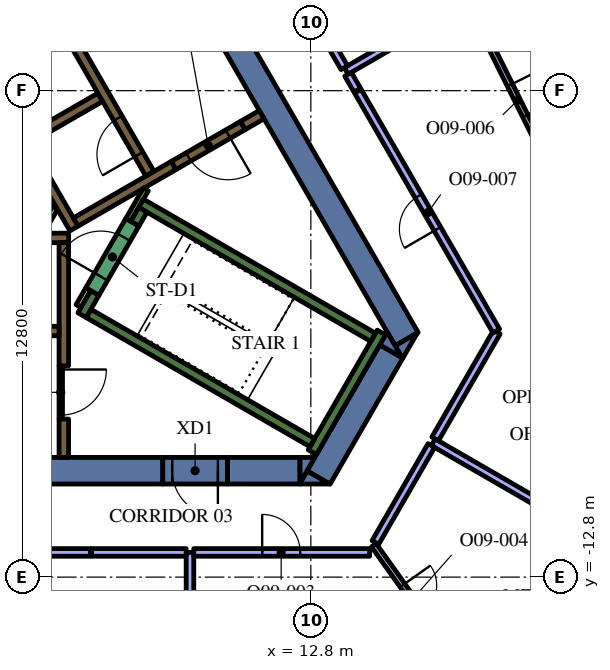
"""IFC4 building model, lengths in metres.
Left out: names, types, materials, properties, quantities, classifications, styles, units other than length and angle.
Written with IfcOpenShell. Run it as: python <this file> out.ifc"""

import sys

from ifc_helpers import new_model, si_unit, direction, frame, frame_2d, origin, place, context, subcontext, project, spatial, polyline, rectangle, outline, extrude, element, fill, save


model = new_model("IFC4")
c1 = context("Model", 3, precision=1e-05, world=origin(), true_north=direction((0.0, 1.0)))
c2 = subcontext(c1, "Body", "Model", "MODEL_VIEW")
j1 = project(units=[si_unit("LENGTHUNIT", "METRE"), si_unit("PLANEANGLEUNIT", "RADIAN")], contexts=[c1])
p1 = place(None, origin())
s1 = spatial("IfcSite", under=j1, at=p1, CompositionType="ELEMENT")
p2 = place(p1, origin())
s2 = spatial("IfcBuilding", under=s1, at=p2, CompositionType="ELEMENT")
p3 = place(p2, frame((0.0, 0.0, 239.4)))
s3 = spatial("IfcBuildingStorey", under=s2, at=p3, CompositionType="ELEMENT", Elevation=239.4)
p4 = place(p3, frame((9.085, 4.264, 0.0), z_axis=(0.0, 0.0, 1.0), x_axis=(0.499998082512, -0.866026510844, 0.0)))
e1 = element("IfcWall", 1, at=p4, inside=s3, PredefinedType="SOLIDWALL", context=c2, shape_type="SweptSolid", body=[
    extrude(rectangle(XDim=12.472, YDim=0.7, at=frame_2d((6.236, 0.0))), origin(), (0.0, 0.0, 1.0), 4.2),
])
p5 = place(p3, origin())
e2 = element("IfcWall", 2, at=p5, inside=s3, PredefinedType="SOLIDWALL", context=c2, shape_type="SweptSolid", body=[
    extrude(outline(polyline([(15.213, -7.05), (15.019, -6.714), (15.601, -6.378), (15.213, -7.05)])), origin(), (0.0, 0.0, 1.0), 4.2),
])
p6 = place(p3, frame((13.003, -10.179, 0.0), z_axis=(0.0, 0.0, 1.0), x_axis=(0.499972675833, 0.866041178825, 0.0)))
e3 = element("IfcWall", 3, at=p6, inside=s3, PredefinedType="SOLIDWALL", context=c2, shape_type="SweptSolid", body=[
    extrude(rectangle(XDim=3.829, YDim=0.7, at=frame_2d((1.915, 0.0))), origin(), (0.0, 0.0, 1.0), 4.2),
])
e4 = element("IfcWall", 4, at=p5, inside=s3, PredefinedType="SOLIDWALL", context=c2, shape_type="SweptSolid", body=[
    extrude(outline(polyline([(12.5, -10.35), (12.698, -10.005), (13.296, -10.35), (12.5, -10.35)])), origin(), (0.0, 0.0, 1.0), 4.2),
])
e5 = element("IfcWall", 5, at=p5, inside=s3, PredefinedType="SOLIDWALL", context=c2, shape_type="SweptSolid", body=[
    extrude(outline(polyline([(14.809, -6.35), (15.197, -7.022), (14.615, -6.686), (14.809, -6.35)])), origin(), (0.0, 0.0, 1.0), 4.2),
])
p7 = place(p3, frame((10.604, -10.0, 0.0), z_axis=(0.0, 0.0, 1.0), x_axis=(1.0, 0.0, 0.0)))
e6 = element("IfcWall", 6, at=p7, inside=s3, PredefinedType="SOLIDWALL", context=c2, shape_type="SweptSolid", body=[
    extrude(rectangle(XDim=1.909, YDim=0.7, at=frame_2d((0.955, 0.0))), origin(), (0.0, 0.0, 1.0), 4.2),
])
e7 = element("IfcWall", 7, at=p5, inside=s3, PredefinedType="SOLIDWALL", context=c2, shape_type="SweptSolid", body=[
    extrude(outline(polyline([(12.904, -9.65), (12.516, -10.322), (12.516, -9.65), (12.904, -9.65)])), origin(), (0.0, 0.0, 1.0), 4.2),
])
p8 = place(p3, frame((8.904, -10.0, 0.0), z_axis=(0.0, 0.0, 1.0), x_axis=(-1.0, 0.0, 0.0)))
e8 = element("IfcWall", 8, at=p8, inside=s3, PredefinedType="SOLIDWALL", context=c2, shape_type="SweptSolid", body=[
    extrude(rectangle(XDim=22.226, YDim=0.7, at=frame_2d((11.113, 0.0))), origin(), (0.0, 0.0, 1.0), 4.2),
])
p9 = place(p3, frame((12.84, -9.511, 0.0), z_axis=(0.0, 0.0, 1.0), x_axis=(0.500048121057, 0.865997619297, 0.0)))
e9 = element("IfcWall", 9, at=p9, inside=s3, PredefinedType="SOLIDWALL", context=c2, shape_type="SweptSolid", body=[
    extrude(rectangle(XDim=3.634, YDim=0.25, at=frame_2d((1.817, 0.0))), origin(), (0.0, 0.0, 1.0), 4.2),
])
p10 = place(p3, frame((12.84, -9.261, 0.0), z_axis=(0.0, 0.0, 1.0), x_axis=(-0.866013990052, 0.500019768644, 0.0)))
e10 = element("IfcWall", 10, at=p10, inside=s3, PredefinedType="SOLIDWALL", context=c2, shape_type="SweptSolid", body=[
    extrude(rectangle(XDim=6.8, YDim=0.25, at=frame_2d((3.4, 0.0))), origin(), (0.0, 0.0, 1.0), 4.2),
])
p11 = place(p3, frame((6.78, -5.906, 0.0), z_axis=(0.0, 0.0, 1.0), x_axis=(0.500223362819, 0.865896406789, 0.0)))
e11 = element("IfcWall", 11, at=p11, inside=s3, PredefinedType="SOLIDWALL", context=c2, shape_type="SweptSolid", body=[
    extrude(rectangle(XDim=0.675, YDim=0.25, at=frame_2d((0.337, 0.0))), origin(), (0.0, 0.0, 1.0), 4.2),
])
p12 = place(p3, frame((8.334, -2.964, 0.0), z_axis=(0.0, 0.0, 1.0), x_axis=(0.866016039709, -0.500016218704, 0.0)))
e12 = element("IfcWall", 12, at=p12, inside=s3, PredefinedType="SOLIDWALL", context=c2, shape_type="SweptSolid", body=[
    extrude(rectangle(XDim=7.05, YDim=0.25, at=frame_2d((3.525, 0.0))), origin(), (0.0, 0.0, 1.0), 4.2),
])
p13 = place(p3, frame((8.168, -3.503, 0.0), z_axis=(0.0, 0.0, 1.0), x_axis=(0.49972245349, 0.866185586049, 0.0)))
e13 = element("IfcWall", 13, at=p13, inside=s3, PredefinedType="SOLIDWALL", context=c2, shape_type="SweptSolid", body=[
    extrude(rectangle(XDim=0.425, YDim=0.25, at=frame_2d((0.212, 0.0))), origin(), (0.0, 0.0, 1.0), 4.2),
])
p14 = place(p3, frame((-5.545, -3.875, 0.0), z_axis=(0.0, 0.0, 1.0), x_axis=(1.0, 0.0, 0.0)))
e14 = element("IfcWall", 14, at=p14, inside=s3, PredefinedType="SOLIDWALL", context=c2, shape_type="SweptSolid", body=[
    extrude(rectangle(XDim=11.97, YDim=0.25, at=frame_2d((5.985, 0.0))), origin(), (0.0, 0.0, 1.0), 4.2),
])
p15 = place(p3, frame((6.3, -7.24, 0.0), z_axis=(0.0, 0.0, 1.0), x_axis=(0.0, 1.0, 0.0)))
e15 = element("IfcWall", 15, at=p15, inside=s3, PredefinedType="SOLIDWALL", context=c2, shape_type="SweptSolid", body=[
    extrude(rectangle(XDim=3.24, YDim=0.25, at=frame_2d((1.62, 0.0))), origin(), (0.0, 0.0, 1.0), 4.2),
])
p16 = place(p3, frame((6.3, -9.65, 0.0), z_axis=(0.0, 0.0, 1.0), x_axis=(0.0, 1.0, 0.0)))
e16 = element("IfcWall", 16, at=p16, inside=s3, PredefinedType="SOLIDWALL", context=c2, shape_type="SweptSolid", body=[
    extrude(rectangle(XDim=1.008, YDim=0.25, at=frame_2d((0.504, 0.0))), origin(), (0.0, 0.0, 1.0), 4.2),
])
p17 = place(p3, frame((11.507, -0.631, 0.0), z_axis=(0.0, 0.0, 1.0), x_axis=(-0.866093731455, -0.499881634324, 0.0)))
e17 = element("IfcWall", 17, at=p17, inside=s3, PredefinedType="SOLIDWALL", context=c2, shape_type="SweptSolid", body=[
    extrude(rectangle(XDim=0.575, YDim=0.25, at=frame_2d((0.288, 0.0))), origin(), (0.0, 0.0, 1.0), 4.2),
])
p18 = place(p3, frame((6.568, -3.627, 0.0), z_axis=(0.0, 0.0, 1.0), x_axis=(-0.499999455981, 0.866025717874, 0.0)))
e18 = element("IfcWall", 18, at=p18, inside=s3, PredefinedType="SOLIDWALL", context=c2, shape_type="SweptSolid", body=[
    extrude(rectangle(XDim=11.978, YDim=0.25, at=frame_2d((5.989, 0.0))), origin(), (0.0, 0.0, 1.0), 4.2),
])
for number, where, z_axis, x_axis in (
    (19, (4.094, 0.909, 0.0), (0.0, 0.0, 1.0), (0.866, 0.5, 0.0)),
    (20, (5.354, -1.274, 0.0), (0.0, 0.0, 1.0), (0.866, 0.5, 0.0)),
):
    element("IfcWall", number, at=place(p3, frame(where, z_axis=z_axis, x_axis=x_axis)), inside=s3, PredefinedType="SOLIDWALL", context=c2, shape_type="SweptSolid", body=[
        extrude(rectangle(XDim=2.2, YDim=0.25, at=frame_2d((1.1, 0.0))), origin(), (0.0, 0.0, 1.0), 4.2),
    ])
p19 = place(p3, frame((6.614, -3.456, 0.0), z_axis=(0.0, 0.0, 1.0), x_axis=(0.866032512851, 0.499987686533, 0.0)))
e21 = element("IfcWall", 21, at=p19, inside=s3, PredefinedType="SOLIDWALL", context=c2, shape_type="SweptSolid", body=[
    extrude(rectangle(XDim=2.975, YDim=0.25, at=frame_2d((1.487, 0.0))), origin(), (0.0, 0.0, 1.0), 4.2),
])
p20 = place(p3, frame((6.945, -5.222, 0.0), z_axis=(0.0, 0.0, 1.0), x_axis=(-0.499818422106, -0.866130212453, 0.0)))
e22 = element("IfcWall", 22, at=p20, inside=s3, PredefinedType="PARTITIONING", context=c2, shape_type="SweptSolid", body=[
    extrude(rectangle(XDim=0.514, YDim=0.15, at=frame_2d((0.257, 0.0))), origin(), (0.0, 0.0, 1.0), 3.45),
])
p21 = place(p3, frame((8.459, -2.599, 0.0), z_axis=(0.0, 0.0, 1.0), x_axis=(-0.500041054325, -0.866001699761, 0.0)))
e23 = element("IfcWall", 23, at=p21, inside=s3, PredefinedType="PARTITIONING", context=c2, shape_type="SweptSolid", body=[
    extrude(rectangle(XDim=0.929, YDim=0.15, at=frame_2d((0.464, 0.0))), origin(), (0.0, 0.0, 1.0), 4.2),
])
p22 = place(p3, frame((5.705, -3.718, 0.0), z_axis=(0.0, 0.0, 1.0), x_axis=(0.499962090823, 0.866047289552, 0.0)))
e24 = element("IfcWall", 24, at=p22, inside=s3, PredefinedType="PARTITIONING", context=c2, shape_type="SweptSolid", body=[
    extrude(rectangle(XDim=0.735, YDim=0.15, at=frame_2d((0.367, 0.0))), origin(), (0.0, 0.0, 1.0), 3.45),
])
p23 = place(p3, frame((-6.175, -6.325, 0.0), z_axis=(0.0, 0.0, 1.0), x_axis=(1.0, 0.0, 0.0)))
e25 = element("IfcWall", 25, at=p23, inside=s3, PredefinedType="SOLIDWALL", context=c2, shape_type="SweptSolid", body=[
    extrude(rectangle(XDim=12.35, YDim=0.25, at=frame_2d((6.175, 0.0))), origin(), (0.0, 0.0, 1.0), 4.2),
])
p24 = place(p23, frame((0.585, 0.0, 0.0)))
e26 = element("IfcOpeningElement", 26, at=p24, cuts=e25, PredefinedType="OPENING", context=c2, shape_type="SweptSolid", body=[
    extrude(rectangle(XDim=1.1, YDim=2.1, at=frame_2d((0.55, 1.05))), frame((0.0, 0.135, 0.0), z_axis=(0.0, -1.0, 0.0), x_axis=(1.0, 0.0, 0.0)), (0.0, 0.0, 1.0), 0.27),
])
p25 = place(p23, frame((3.105, 0.0, 0.0)))
e27 = element("IfcOpeningElement", 27, at=p25, cuts=e25, PredefinedType="OPENING", context=c2, shape_type="SweptSolid", body=[
    extrude(rectangle(XDim=1.1, YDim=2.1, at=frame_2d((0.55, 1.05))), frame((0.0, 0.135, 0.0), z_axis=(0.0, -1.0, 0.0), x_axis=(1.0, 0.0, 0.0)), (0.0, 0.0, 1.0), 0.27),
])
p26 = place(p23, frame((5.625, 0.0, 0.0)))
e28 = element("IfcOpeningElement", 28, at=p26, cuts=e25, PredefinedType="OPENING", context=c2, shape_type="SweptSolid", body=[
    extrude(rectangle(XDim=1.1, YDim=2.1, at=frame_2d((0.55, 1.05))), frame((0.0, 0.135, 0.0), z_axis=(0.0, -1.0, 0.0), x_axis=(1.0, 0.0, 0.0)), (0.0, 0.0, 1.0), 0.27),
])
p27 = place(p23, frame((8.145, 0.0, 0.0)))
e29 = element("IfcOpeningElement", 29, at=p27, cuts=e25, PredefinedType="OPENING", context=c2, shape_type="SweptSolid", body=[
    extrude(rectangle(XDim=1.1, YDim=2.1, at=frame_2d((0.55, 1.05))), frame((0.0, 0.135, 0.0), z_axis=(0.0, -1.0, 0.0), x_axis=(1.0, 0.0, 0.0)), (0.0, 0.0, 1.0), 0.27),
])
p28 = place(p23, frame((10.665, 0.0, 0.0)))
e30 = element("IfcOpeningElement", 30, at=p28, cuts=e25, PredefinedType="OPENING", context=c2, shape_type="SweptSolid", body=[
    extrude(rectangle(XDim=1.1, YDim=2.1, at=frame_2d((0.55, 1.05))), frame((0.0, 0.135, 0.0), z_axis=(0.0, -1.0, 0.0), x_axis=(1.0, 0.0, 0.0)), (0.0, 0.0, 1.0), 0.27),
])
p29 = place(p3, frame((8.565, -2.185, 0.0), z_axis=(0.0, 0.0, 1.0), x_axis=(-0.499997954832, 0.866026584559, 0.0)))
e31 = element("IfcWall", 31, at=p29, inside=s3, PredefinedType="SOLIDWALL", context=c2, shape_type="SweptSolid", body=[
    extrude(rectangle(XDim=12.35, YDim=0.25, at=frame_2d((6.175, 0.0))), origin(), (0.0, 0.0, 1.0), 4.2),
])
p30 = place(p29, frame((0.585, 0.0, 0.0)))
e32 = element("IfcOpeningElement", 32, at=p30, cuts=e31, PredefinedType="OPENING", context=c2, shape_type="SweptSolid", body=[
    extrude(rectangle(XDim=1.1, YDim=2.1, at=frame_2d((0.55, 1.05))), frame((0.0, 0.135, 0.0), z_axis=(0.0, -1.0, 0.0), x_axis=(1.0, 0.0, 0.0)), (0.0, 0.0, 1.0), 0.27),
])
p31 = place(p3, frame((7.053, -5.284, 0.0), z_axis=(0.0, 0.0, 1.0), x_axis=(0.500078061341, 0.865980330357, 0.0)))
e33 = element("IfcWall", 33, at=p31, inside=s3, PredefinedType="SOLIDWALL", context=c2, shape_type="SweptSolid", body=[
    extrude(rectangle(XDim=2.1, YDim=0.4, at=frame_2d((1.05, 0.0))), origin(), (0.0, 0.0, 1.0), 4.2),
])
p32 = place(p31, frame((0.45, 0.0, 0.0)))
e34 = element("IfcOpeningElement", 34, at=p32, cuts=e33, PredefinedType="OPENING", context=c2, shape_type="SweptSolid", body=[
    extrude(rectangle(XDim=1.2, YDim=2.1, at=frame_2d((0.6, 1.05))), frame((0.0, 0.21, 0.0), z_axis=(0.0, -1.0, 0.0), x_axis=(1.0, 0.0, 0.0)), (0.0, 0.0, 1.0), 0.42),
])
p33 = place(p3, frame((6.22, -7.237, 0.0), z_axis=(0.0, 0.0, 1.0), x_axis=(0.0, -1.0, 0.0)))
e35 = element("IfcWall", 35, at=p33, inside=s3, PredefinedType="PARTITIONING", context=c2, shape_type="SweptSolid", body=[
    extrude(rectangle(XDim=1.4, YDim=0.09, at=frame_2d((0.7, 0.0))), origin(), (0.0, 0.0, 1.0), 3.45),
])
p34 = place(p33, frame((0.1, 0.0, 0.0)))
e36 = element("IfcOpeningElement", 36, at=p34, cuts=e35, PredefinedType="OPENING", context=c2, shape_type="SweptSolid", body=[
    extrude(rectangle(XDim=1.2, YDim=2.1, at=frame_2d((0.6, 1.05))), frame((0.0, 0.055, 0.0), z_axis=(0.0, -1.0, 0.0), x_axis=(1.0, 0.0, 0.0)), (0.0, 0.0, 1.0), 0.11),
])
p35 = place(p3, frame((11.009, -0.919, 0.0), z_axis=(0.0, 0.0, 1.0), x_axis=(-0.866059744384, -0.49994051562, 0.0)))
e37 = element("IfcWall", 37, at=p35, inside=s3, PredefinedType="SOLIDWALL", context=c2, shape_type="SweptSolid", body=[
    extrude(rectangle(XDim=2.1, YDim=0.25, at=frame_2d((1.05, 0.0))), origin(), (0.0, 0.0, 1.0), 4.2),
])
p36 = place(p35, frame((0.45, 0.0, 0.0)))
e38 = element("IfcOpeningElement", 38, at=p36, cuts=e37, PredefinedType="OPENING", context=c2, shape_type="SweptSolid", body=[
    extrude(rectangle(XDim=1.2, YDim=2.1, at=frame_2d((0.6, 1.05))), frame((0.0, 0.135, 0.0), z_axis=(0.0, -1.0, 0.0), x_axis=(1.0, 0.0, 0.0)), (0.0, 0.0, 1.0), 0.27),
])
p37 = place(p3, frame((10.604, -10.0, 0.0), z_axis=(0.0, 0.0, 1.0), x_axis=(-1.0, 0.0, 0.0)))
e39 = element("IfcWall", 39, at=p37, inside=s3, PredefinedType="SOLIDWALL", context=c2, shape_type="SweptSolid", body=[
    extrude(rectangle(XDim=1.7, YDim=0.7, at=frame_2d((0.85, 0.0))), origin(), (0.0, 0.0, 1.0), 4.2),
])
p38 = place(p37, frame((0.25, 0.0, 0.0)))
e40 = element("IfcOpeningElement", 40, at=p38, cuts=e39, PredefinedType="OPENING", context=c2, shape_type="SweptSolid", body=[
    extrude(rectangle(XDim=1.2, YDim=2.1, at=frame_2d((0.6, 1.05))), frame((0.0, 0.36, 0.0), z_axis=(0.0, -1.0, 0.0), x_axis=(1.0, 0.0, 0.0)), (0.0, 0.0, 1.0), 0.72),
])
p39 = place(p3, frame((9.62, -12.15, 0.0), z_axis=(0.0, 0.0, 1.0), x_axis=(0.0, -1.0, 0.0)))
e41 = element("IfcWall", 41, at=p39, inside=s3, PredefinedType="PARTITIONING", context=c2, shape_type="SweptSolid", body=[
    extrude(rectangle(XDim=3.705, YDim=0.2, at=frame_2d((1.853, 0.0))), origin(), (0.0, 0.0, 1.0), 3.45),
])
p40 = place(p3, frame((-7.0, -12.15, 0.0), z_axis=(0.0, 0.0, 1.0), x_axis=(1.0, 0.0, 0.0)))
e42 = element("IfcWall", 42, at=p40, inside=s3, PredefinedType="PARTITIONING", context=c2, shape_type="SweptSolid", body=[
    extrude(rectangle(XDim=14.0, YDim=0.2, at=frame_2d((7.0, 0.0))), origin(), (0.0, 0.0, 1.0), 3.45),
])
p41 = place(p40, frame((6.5, 0.0, 0.0)))
e43 = element("IfcOpeningElement", 43, at=p41, cuts=e42, PredefinedType="OPENING", context=c2, shape_type="SweptSolid", body=[
    extrude(rectangle(XDim=1.0, YDim=2.1, at=frame_2d((0.5, 1.05))), frame((0.0, 0.11, 0.0), z_axis=(0.0, -1.0, 0.0), x_axis=(1.0, 0.0, 0.0)), (0.0, 0.0, 1.0), 0.22),
])
p42 = place(p3, frame((7.03, -12.15, 0.0), z_axis=(0.0, 0.0, 1.0), x_axis=(1.0, 0.0, 0.0)))
e44 = element("IfcWall", 44, at=p42, inside=s3, PredefinedType="PARTITIONING", context=c2, shape_type="SweptSolid", body=[
    extrude(rectangle(XDim=2.49, YDim=0.2, at=frame_2d((1.245, 0.0))), origin(), (0.0, 0.0, 1.0), 3.45),
])
p43 = place(p3, frame((14.457, -11.96, 0.0), z_axis=(0.0, 0.0, 1.0), x_axis=(0.581049944662, -0.81386790194, 0.0)))
e45 = element("IfcWall", 45, at=p43, inside=s3, PredefinedType="PARTITIONING", context=c2, shape_type="SweptSolid", body=[
    extrude(rectangle(XDim=3.926, YDim=0.15, at=frame_2d((1.963, 0.0))), origin(), (0.0, 0.0, 1.0), 3.45),
])
p44 = place(p43, frame((1.3, 0.0, 0.0)))
e46 = element("IfcOpeningElement", 46, at=p44, cuts=e45, PredefinedType="OPENING", context=c2, shape_type="SweptSolid", body=[
    extrude(rectangle(XDim=0.9, YDim=2.1, at=frame_2d((0.45, 1.05))), frame((0.0, 0.085, 0.0), z_axis=(0.0, -1.0, 0.0), x_axis=(1.0, 0.0, 0.0)), (0.0, 0.0, 1.0), 0.17),
])
p45 = place(p3, frame((9.72, -12.15, 0.0), z_axis=(0.0, 0.0, 1.0), x_axis=(1.0, 0.0, 0.0)))
e47 = element("IfcWall", 47, at=p45, inside=s3, PredefinedType="PARTITIONING", context=c2, shape_type="SweptSolid", body=[
    extrude(rectangle(XDim=4.627, YDim=0.2, at=frame_2d((2.314, 0.0))), origin(), (0.0, 0.0, 1.0), 3.45),
])
p46 = place(p45, frame((1.8, 0.0, 0.0)))
e48 = element("IfcOpeningElement", 48, at=p46, cuts=e47, PredefinedType="OPENING", context=c2, shape_type="SweptSolid", body=[
    extrude(rectangle(XDim=1.0, YDim=2.1, at=frame_2d((0.5, 1.05))), frame((0.0, 0.11, 0.0), z_axis=(0.0, -1.0, 0.0), x_axis=(1.0, 0.0, 0.0)), (0.0, 0.0, 1.0), 0.22),
])
p47 = place(p3, frame((16.021, -9.25, 0.0), z_axis=(0.0, 0.0, 1.0), x_axis=(0.86602692059, -0.499997372806, 0.0)))
e49 = element("IfcWall", 49, at=p47, inside=s3, PredefinedType="PARTITIONING", context=c2, shape_type="SweptSolid", body=[
    extrude(rectangle(XDim=6.765, YDim=0.2, at=frame_2d((3.382, 0.0))), origin(), (0.0, 0.0, 1.0), 3.45),
])
p48 = place(p3, frame((14.498, -11.888, 0.0), z_axis=(0.0, 0.0, 1.0), x_axis=(0.500006981563, 0.86602137294, 0.0)))
e50 = element("IfcWall", 50, at=p48, inside=s3, PredefinedType="PARTITIONING", context=c2, shape_type="SweptSolid", body=[
    extrude(rectangle(XDim=2.946, YDim=0.2, at=frame_2d((1.473, 0.0))), origin(), (0.0, 0.0, 1.0), 3.45),
])
p49 = place(p3, frame((16.935, 2.368, 0.0), z_axis=(0.0, 0.0, 1.0), x_axis=(0.445153322039, -0.895454365045, 0.0)))
e51 = element("IfcWall", 51, at=p49, inside=s3, PredefinedType="PARTITIONING", context=c2, shape_type="SweptSolid", body=[
    extrude(rectangle(XDim=5.881, YDim=0.15, at=frame_2d((2.94, 0.0))), origin(), (0.0, 0.0, 1.0), 3.45),
])
p50 = place(p49, frame((2.481, 0.0, 0.0)))
e52 = element("IfcOpeningElement", 52, at=p50, cuts=e51, PredefinedType="OPENING", context=c2, shape_type="SweptSolid", body=[
    extrude(rectangle(XDim=0.9, YDim=2.1, at=frame_2d((0.45, 1.05))), frame((0.0, 0.085, 0.0), z_axis=(0.0, -1.0, 0.0), x_axis=(1.0, 0.0, 0.0)), (0.0, 0.0, 1.0), 0.17),
])
p51 = place(p3, frame((13.731, 0.518, 0.0), z_axis=(0.0, 0.0, 1.0), x_axis=(0.8660128559, 0.500021732944, 0.0)))
e53 = element("IfcWall", 53, at=p51, inside=s3, PredefinedType="PARTITIONING", context=c2, shape_type="SweptSolid", body=[
    extrude(rectangle(XDim=3.625, YDim=0.2, at=frame_2d((1.812, 0.0))), origin(), (0.0, 0.0, 1.0), 3.45),
])
p52 = place(p3, frame((14.022, 0.013, 0.0), z_axis=(0.0, 0.0, 1.0), x_axis=(-0.500159754115, 0.865933150054, 0.0)))
e54 = element("IfcWall", 54, at=p52, inside=s3, PredefinedType="PARTITIONING", context=c2, shape_type="SweptSolid", body=[
    extrude(rectangle(XDim=0.483, YDim=0.2, at=frame_2d((0.242, 0.0))), origin(), (0.0, 0.0, 1.0), 3.45),
])
p53 = place(p3, frame((16.072, -9.163, 0.0), z_axis=(0.0, 0.0, 1.0), x_axis=(0.500010870188, 0.866019127788, 0.0)))
e55 = element("IfcWall", 55, at=p53, inside=s3, PredefinedType="PARTITIONING", context=c2, shape_type="SweptSolid", body=[
    extrude(rectangle(XDim=3.249, YDim=0.2, at=frame_2d((1.624, 0.0))), origin(), (0.0, 0.0, 1.0), 3.45),
])
p54 = place(p3, frame((17.681, -6.324, 0.0), z_axis=(0.0, 0.0, 1.0), x_axis=(-0.50002695829, 0.866009838849, 0.0)))
e56 = element("IfcWall", 56, at=p54, inside=s3, PredefinedType="PARTITIONING", context=c2, shape_type="SweptSolid", body=[
    extrude(rectangle(XDim=7.287, YDim=0.2, at=frame_2d((3.644, 0.0))), origin(), (0.0, 0.0, 1.0), 3.45),
])
p55 = place(p54, frame((3.1, 0.0, 0.0)))
e57 = element("IfcOpeningElement", 57, at=p55, cuts=e56, PredefinedType="OPENING", context=c2, shape_type="SweptSolid", body=[
    extrude(rectangle(XDim=1.0, YDim=2.1, at=frame_2d((0.5, 1.05))), frame((0.0, 0.11, 0.0), z_axis=(0.0, -1.0, 0.0), x_axis=(1.0, 0.0, 0.0)), (0.0, 0.0, 1.0), 0.22),
])
p56 = place(p3, frame((13.681, 0.604, 0.0), z_axis=(0.0, 0.0, 1.0), x_axis=(-0.500001759768, 0.86602438778, 0.0)))
e58 = element("IfcWall", 58, at=p56, inside=s3, PredefinedType="PARTITIONING", context=c2, shape_type="SweptSolid", body=[
    extrude(rectangle(XDim=13.317, YDim=0.2, at=frame_2d((6.658, 0.0))), origin(), (0.0, 0.0, 1.0), 3.45),
])
p57 = place(p56, frame((6.2, 0.0, 0.0)))
e59 = element("IfcOpeningElement", 59, at=p57, cuts=e58, PredefinedType="OPENING", context=c2, shape_type="SweptSolid", body=[
    extrude(rectangle(XDim=1.0, YDim=2.1, at=frame_2d((0.5, 1.05))), frame((0.0, 0.11, 0.0), z_axis=(0.0, -1.0, 0.0), x_axis=(1.0, 0.0, 0.0)), (0.0, 0.0, 1.0), 0.22),
])
p58 = place(p30, origin())
e60 = element("IfcDoor", 60, at=p58, inside=s3, OperationType="DOUBLE_DOOR_SLIDING", PredefinedType="DOOR", context=c2, shape_type="SweptSolid", body=[
    extrude(rectangle(XDim=1.1, YDim=2.1, at=frame_2d((0.55, 1.05))), frame((0.0, 0.025, 0.0), z_axis=(0.0, -1.0, 0.0), x_axis=(1.0, 0.0, 0.0)), (0.0, 0.0, 1.0), 0.05),
])
fill(e32, e60)
p59 = place(p32, origin())
e61 = element("IfcDoor", 61, at=p59, inside=s3, OperationType="SINGLE_SWING_LEFT", PredefinedType="DOOR", context=c2, shape_type="SweptSolid", body=[
    extrude(rectangle(XDim=1.2, YDim=2.1, at=frame_2d((0.6, 1.05))), frame((0.0, 0.025, 0.0), z_axis=(0.0, -1.0, 0.0), x_axis=(1.0, 0.0, 0.0)), (0.0, 0.0, 1.0), 0.05),
])
fill(e34, e61)
p60 = place(p34, origin())
e62 = element("IfcDoor", 62, at=p60, inside=s3, OperationType="SINGLE_SWING_LEFT", PredefinedType="DOOR", context=c2, shape_type="SweptSolid", body=[
    extrude(rectangle(XDim=1.2, YDim=2.1, at=frame_2d((0.6, 1.05))), frame((0.0, 0.025, 0.0), z_axis=(0.0, -1.0, 0.0), x_axis=(1.0, 0.0, 0.0)), (0.0, 0.0, 1.0), 0.05),
])
fill(e36, e62)
p61 = place(p36, origin())
e63 = element("IfcDoor", 63, at=p61, inside=s3, OperationType="SINGLE_SWING_LEFT", PredefinedType="DOOR", context=c2, shape_type="SweptSolid", body=[
    extrude(rectangle(XDim=1.2, YDim=2.1, at=frame_2d((0.6, 1.05))), frame((0.0, 0.025, 0.0), z_axis=(0.0, -1.0, 0.0), x_axis=(1.0, 0.0, 0.0)), (0.0, 0.0, 1.0), 0.05),
])
fill(e38, e63)
p62 = place(p38, origin())
e64 = element("IfcDoor", 64, at=p62, inside=s3, OperationType="SINGLE_SWING_LEFT", PredefinedType="DOOR", context=c2, shape_type="SweptSolid", body=[
    extrude(rectangle(XDim=1.2, YDim=2.1, at=frame_2d((0.6, 1.05))), frame((0.0, 0.025, 0.0), z_axis=(0.0, -1.0, 0.0), x_axis=(1.0, 0.0, 0.0)), (0.0, 0.0, 1.0), 0.05),
])
fill(e40, e64)
p63 = place(p46, origin())
e65 = element("IfcDoor", 65, at=p63, inside=s3, OperationType="SINGLE_SWING_LEFT", PredefinedType="DOOR", context=c2, shape_type="SweptSolid", body=[
    extrude(rectangle(XDim=1.0, YDim=2.1, at=frame_2d((0.5, 1.05))), frame((0.0, 0.025, 0.0), z_axis=(0.0, -1.0, 0.0), x_axis=(1.0, 0.0, 0.0)), (0.0, 0.0, 1.0), 0.05),
])
fill(e48, e65)
p64 = place(p44, origin())
e66 = element("IfcDoor", 66, at=p64, inside=s3, OperationType="SINGLE_SWING_LEFT", PredefinedType="DOOR", context=c2, shape_type="SweptSolid", body=[
    extrude(rectangle(XDim=0.9, YDim=2.1, at=frame_2d((0.45, 1.05))), frame((0.0, 0.025, 0.0), z_axis=(0.0, -1.0, 0.0), x_axis=(1.0, 0.0, 0.0)), (0.0, 0.0, 1.0), 0.05),
])
fill(e46, e66)
p65 = place(p50, origin())
e67 = element("IfcDoor", 67, at=p65, inside=s3, OperationType="SINGLE_SWING_LEFT", PredefinedType="DOOR", context=c2, shape_type="SweptSolid", body=[
    extrude(rectangle(XDim=0.9, YDim=2.1, at=frame_2d((0.45, 1.05))), frame((0.0, 0.025, 0.0), z_axis=(0.0, -1.0, 0.0), x_axis=(1.0, 0.0, 0.0)), (0.0, 0.0, 1.0), 0.05),
])
fill(e52, e67)
p66 = place(p55, origin())
e68 = element("IfcDoor", 68, at=p66, inside=s3, OperationType="SINGLE_SWING_LEFT", PredefinedType="DOOR", context=c2, shape_type="SweptSolid", body=[
    extrude(rectangle(XDim=1.0, YDim=2.1, at=frame_2d((0.5, 1.05))), frame((0.0, 0.025, 0.0), z_axis=(0.0, -1.0, 0.0), x_axis=(1.0, 0.0, 0.0)), (0.0, 0.0, 1.0), 0.05),
])
fill(e57, e68)
save(model, sys.argv[1])
